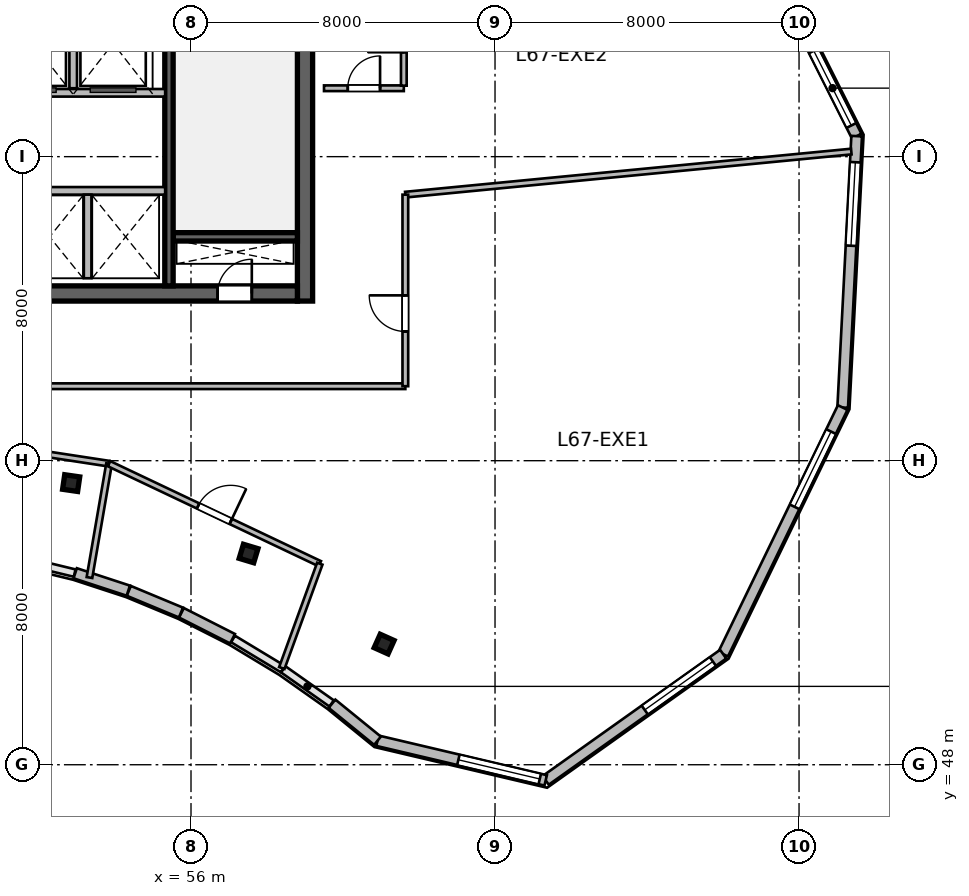
"""IFC4 building model, lengths in metres.
Left out: names, types, materials, properties, quantities, classifications, styles, units other than length and angle.
Written with IfcOpenShell. Run it as: python <this file> out.ifc"""

import sys

from ifc_helpers import new_model, si_unit, direction, frame, frame_2d, origin, origin_2d, place, context, subcontext, project, spatial, rectangle, i_section, extrude, source, transform, mapped, element, fill, save


model = new_model("IFC4")
c1 = context("Model", 3, precision=1e-05, world=origin(), true_north=direction((0.0, 1.0)))
c2 = subcontext(c1, "Body", "Model", "MODEL_VIEW")
j1 = project(units=[si_unit("LENGTHUNIT", "METRE"), si_unit("PLANEANGLEUNIT", "RADIAN")], contexts=[c1])
p1 = place(None, origin())
s1 = spatial("IfcSite", under=j1, at=p1, CompositionType="ELEMENT")
p2 = place(p1, origin())
s2 = spatial("IfcBuilding", under=s1, at=p2, CompositionType="ELEMENT")
p3 = place(p2, frame((0.0, 0.0, 275.7)))
s3 = spatial("IfcBuildingStorey", under=s2, at=p3, CompositionType="ELEMENT", Elevation=275.7)
m1 = source(origin(), c2, "Body", "SweptSolid", [
    extrude(rectangle(XDim=12.0, YDim=0.4, at=frame_2d((6.0, 0.0))), origin(), (0.0, 0.0, 1.0), 3.9),
])
p4 = place(p3, frame((59.0, 60.2, 0.0), z_axis=(0.0, 0.0, 1.0), x_axis=(0.0, 1.0, 0.0)))
e1 = element("IfcWall", 1, at=p4, inside=s3, PredefinedType="SHEAR", context=c2, shape_type="MappedRepresentation", body=[
    mapped(m1, transform((0.0, 0.0, 0.0), scale=1.0)),
])
m2 = source(origin(), c2, "Body", "SweptSolid", [
    extrude(rectangle(XDim=21.6, YDim=0.4, at=frame_2d((10.8, 0.0))), origin(), (0.0, 0.0, 1.0), 3.9),
])
p5 = place(p3, frame((37.2, 60.4, 0.0), z_axis=(0.0, 0.0, 1.0), x_axis=(1.0, 0.0, 0.0)))
e2 = element("IfcWall", 2, at=p5, inside=s3, PredefinedType="SHEAR", context=c2, shape_type="MappedRepresentation", body=[
    mapped(m2, transform((0.0, 0.0, 0.0), scale=1.0)),
])
p6 = place(p5, frame((1.1, 0.0, 0.0)))
e3 = element("IfcOpeningElement", 3, at=p6, cuts=e2, PredefinedType="OPENING", context=c2, shape_type="SweptSolid", body=[
    extrude(rectangle(XDim=1.15, YDim=2.15, at=frame_2d((0.575, 1.075))), frame((0.0, 0.21, 0.0), z_axis=(0.0, -1.0, 0.0), x_axis=(1.0, 0.0, 0.0)), (0.0, 0.0, 1.0), 0.42),
])
p7 = place(p5, frame((19.5, 0.0, 0.0)))
e4 = element("IfcOpeningElement", 4, at=p7, cuts=e2, PredefinedType="OPENING", context=c2, shape_type="SweptSolid", body=[
    extrude(rectangle(XDim=0.9, YDim=2.1, at=frame_2d((0.45, 1.05))), frame((0.0, 0.21, 0.0), z_axis=(0.0, -1.0, 0.0), x_axis=(1.0, 0.0, 0.0)), (0.0, 0.0, 1.0), 0.42),
])
p8 = place(p5, frame((12.02, 0.0, 0.0)))
e5 = element("IfcOpeningElement", 5, at=p8, cuts=e2, PredefinedType="OPENING", context=c2, shape_type="SweptSolid", body=[
    extrude(rectangle(XDim=1.6, YDim=2.15, at=frame_2d((0.8, 1.075))), frame((0.0, 0.21, 0.0), z_axis=(0.0, -1.0, 0.0), x_axis=(1.0, 0.0, 0.0)), (0.0, 0.0, 1.0), 0.42),
])
m3 = source(origin(), c2, "Body", "SweptSolid", [
    extrude(rectangle(XDim=3.27, YDim=0.22, at=frame_2d((1.635, 0.0))), origin(), (0.0, 0.0, 1.0), 3.9),
])
p9 = place(p3, frame((55.53, 61.89, 0.0), z_axis=(0.0, 0.0, 1.0), x_axis=(1.0, 0.0, 0.0)))
e6 = element("IfcWall", 6, at=p9, inside=s3, PredefinedType="SHEAR", context=c2, shape_type="MappedRepresentation", body=[
    mapped(m3, transform((0.0, 0.0, 0.0), scale=1.0)),
])
m4 = source(origin(), c2, "Body", "SweptSolid", [
    extrude(rectangle(XDim=11.2, YDim=0.22, at=frame_2d((5.6, 0.0))), origin(), (0.0, 0.0, 1.0), 3.9),
])
p10 = place(p3, frame((55.42, 60.6, 0.0), z_axis=(0.0, 0.0, 1.0), x_axis=(0.0, 1.0, 0.0)))
e7 = element("IfcWall", 7, at=p10, inside=s3, PredefinedType="SHEAR", context=c2, shape_type="MappedRepresentation", body=[
    mapped(m4, transform((0.0, 0.0, 0.0), scale=1.0)),
])
p11 = place(p10, frame((9.645, 0.0, 0.0)))
e8 = element("IfcOpeningElement", 8, at=p11, cuts=e7, PredefinedType="OPENING", context=c2, shape_type="SweptSolid", body=[
    extrude(rectangle(XDim=1.15, YDim=2.15, at=frame_2d((0.575, 1.075))), frame((0.0, 0.12, 0.0), z_axis=(0.0, -1.0, 0.0), x_axis=(1.0, 0.0, 0.0)), (0.0, 0.0, 1.0), 0.24),
])
m5 = source(origin(), c2, "Body", "SweptSolid", [
    extrude(i_section(OverallWidth=0.399, OverallDepth=0.387, WebThickness=0.021, FlangeThickness=0.033, at=origin_2d()), origin(), (0.0, 0.0, 1.0), 3.9),
])
for number, where, z_axis, x_axis in (
    (9, (52.846, 55.411, 0.0), (0.0, 0.0, 1.0), (0.143, 0.99, 0.0)),
    (10, (57.515, 53.558, 0.0), (0.0, 0.0, 1.0), (0.289, 0.957, 0.0)),
    (11, (61.082, 51.175, 0.0), (0.0, 0.0, 1.0), (0.409, 0.912, 0.0)),
):
    element("IfcColumn", number, at=place(p3, frame(where, z_axis=z_axis, x_axis=x_axis)), inside=s3, PredefinedType="COLUMN", context=c2, shape_type="MappedRepresentation", body=[
        mapped(m5, transform((0.0, 0.0, 0.0), scale=1.0)),
    ])
m6 = source(origin(), c2, "Body", "SweptSolid", [
    extrude(rectangle(XDim=5.653, YDim=0.28, at=frame_2d((2.827, 0.0))), origin(), (0.0, 0.0, 1.0), 3.64),
])
p12 = place(p3, frame((70.976, 69.591, 0.0), z_axis=(0.0, 0.0, 1.0), x_axis=(0.449302555419, -0.893379658205, 0.0)))
e12 = element("IfcWall", 12, at=p12, inside=s3, PredefinedType="SOLIDWALL", context=c2, shape_type="MappedRepresentation", body=[
    mapped(m6, transform((0.0, 0.0, 0.0), scale=1.0)),
])
p13 = place(p12, frame((3.14, 0.0, 0.95)))
e13 = element("IfcOpeningElement", 13, at=p13, cuts=e12, PredefinedType="OPENING", context=c2, shape_type="SweptSolid", body=[
    extrude(rectangle(XDim=2.2, YDim=2.1, at=frame_2d((1.1, 1.05))), frame((0.0, 0.15, 0.0), z_axis=(0.0, -1.0, 0.0), x_axis=(1.0, 0.0, 0.0)), (0.0, 0.0, 1.0), 0.3),
])
m7 = source(origin(), c2, "Body", "SweptSolid", [
    extrude(rectangle(XDim=7.151, YDim=0.28, at=frame_2d((3.576, 0.0))), origin(), (0.0, 0.0, 1.0), 3.64),
])
p14 = place(p3, frame((73.516, 64.54, 0.0), z_axis=(0.0, 0.0, 1.0), x_axis=(-0.051449614265, -0.998675591567, 0.0)))
e14 = element("IfcWall", 14, at=p14, inside=s3, PredefinedType="SOLIDWALL", context=c2, shape_type="MappedRepresentation", body=[
    mapped(m7, transform((0.0, 0.0, 0.0), scale=1.0)),
])
p15 = place(p14, frame((0.688, 0.0, 0.95)))
e15 = element("IfcOpeningElement", 15, at=p15, cuts=e14, PredefinedType="OPENING", context=c2, shape_type="SweptSolid", body=[
    extrude(rectangle(XDim=2.2, YDim=2.1, at=frame_2d((1.1, 1.05))), frame((0.0, 0.15, 0.0), z_axis=(0.0, -1.0, 0.0), x_axis=(1.0, 0.0, 0.0)), (0.0, 0.0, 1.0), 0.3),
])
m8 = source(origin(), c2, "Body", "SweptSolid", [
    extrude(rectangle(XDim=7.211, YDim=0.28, at=frame_2d((3.606, 0.0))), origin(), (0.0, 0.0, 1.0), 3.64),
])
p16 = place(p3, frame((73.148, 57.399, 0.0), z_axis=(0.0, 0.0, 1.0), x_axis=(-0.436088263006, -0.899903898685, 0.0)))
e16 = element("IfcWall", 16, at=p16, inside=s3, PredefinedType="SOLIDWALL", context=c2, shape_type="MappedRepresentation", body=[
    mapped(m8, transform((0.0, 0.0, 0.0), scale=1.0)),
])
p17 = place(p16, frame((0.703, 0.0, 0.95)))
e17 = element("IfcOpeningElement", 17, at=p17, cuts=e16, PredefinedType="OPENING", context=c2, shape_type="SweptSolid", body=[
    extrude(rectangle(XDim=2.2, YDim=2.1, at=frame_2d((1.1, 1.05))), frame((0.0, 0.15, 0.0), z_axis=(0.0, -1.0, 0.0), x_axis=(1.0, 0.0, 0.0)), (0.0, 0.0, 1.0), 0.3),
])
m9 = source(origin(), c2, "Body", "SweptSolid", [
    extrude(rectangle(XDim=5.731, YDim=0.28, at=frame_2d((2.865, 0.0))), origin(), (0.0, 0.0, 1.0), 3.64),
])
p18 = place(p3, frame((70.004, 50.909, 0.0), z_axis=(0.0, 0.0, 1.0), x_axis=(-0.815021045908, -0.579431354629, 0.0)))
e18 = element("IfcWall", 18, at=p18, inside=s3, PredefinedType="SOLIDWALL", context=c2, shape_type="MappedRepresentation", body=[
    mapped(m9, transform((0.0, 0.0, 0.0), scale=1.0)),
])
p19 = place(p18, frame((0.333, 0.0, 0.95)))
e19 = element("IfcOpeningElement", 19, at=p19, cuts=e18, PredefinedType="OPENING", context=c2, shape_type="SweptSolid", body=[
    extrude(rectangle(XDim=2.2, YDim=2.1, at=frame_2d((1.1, 1.05))), frame((0.0, 0.15, 0.0), z_axis=(0.0, -1.0, 0.0), x_axis=(1.0, 0.0, 0.0)), (0.0, 0.0, 1.0), 0.3),
])
m10 = source(origin(), c2, "Body", "SweptSolid", [
    extrude(rectangle(XDim=4.547, YDim=0.28, at=frame_2d((2.273, 0.0))), origin(), (0.0, 0.0, 1.0), 3.64),
])
p20 = place(p3, frame((65.333, 47.589, 0.0), z_axis=(0.0, 0.0, 1.0), x_axis=(-0.973332593516, 0.229398479505, 0.0)))
e20 = element("IfcWall", 20, at=p20, inside=s3, PredefinedType="SOLIDWALL", context=c2, shape_type="MappedRepresentation", body=[
    mapped(m10, transform((0.0, 0.0, 0.0), scale=1.0)),
])
p21 = place(p20, frame((0.16, 0.0, 0.95)))
e21 = element("IfcOpeningElement", 21, at=p21, cuts=e20, PredefinedType="OPENING", context=c2, shape_type="SweptSolid", body=[
    extrude(rectangle(XDim=2.2, YDim=2.1, at=frame_2d((1.1, 1.05))), frame((0.0, 0.15, 0.0), z_axis=(0.0, -1.0, 0.0), x_axis=(1.0, 0.0, 0.0)), (0.0, 0.0, 1.0), 0.3),
])
m11 = source(origin(), c2, "Body", "SweptSolid", [
    extrude(rectangle(XDim=1.543, YDim=0.28, at=frame_2d((0.772, 0.0))), origin(), (0.0, 0.0, 1.0), 3.64),
])
p22 = place(p3, frame((60.908, 48.632, 0.0), z_axis=(0.0, 0.0, 1.0), x_axis=(-0.77582846857, 0.63094388606, 0.0)))
e22 = element("IfcWall", 22, at=p22, inside=s3, PredefinedType="SOLIDWALL", context=c2, shape_type="MappedRepresentation", body=[
    mapped(m11, transform((0.0, 0.0, 0.0), scale=1.0)),
])
m12 = source(origin(), c2, "Body", "SweptSolid", [
    extrude(rectangle(XDim=1.509, YDim=0.28, at=frame_2d((0.754, 0.0))), origin(), (0.0, 0.0, 1.0), 3.64),
])
p23 = place(p3, frame((57.094, 51.315, 0.0), z_axis=(0.0, 0.0, 1.0), x_axis=(-0.89169189228, 0.452642871635, 0.0)))
e23 = element("IfcWall", 23, at=p23, inside=s3, PredefinedType="SOLIDWALL", context=c2, shape_type="MappedRepresentation", body=[
    mapped(m12, transform((0.0, 0.0, 0.0), scale=1.0)),
])
m13 = source(origin(), c2, "Body", "SweptSolid", [
    extrude(rectangle(XDim=1.488, YDim=0.28, at=frame_2d((0.744, 0.0))), origin(), (0.0, 0.0, 1.0), 3.64),
])
p24 = place(p3, frame((55.736, 52.004, 0.0), z_axis=(0.0, 0.0, 1.0), x_axis=(-0.923261314935, 0.384172545017, 0.0)))
e24 = element("IfcWall", 24, at=p24, inside=s3, PredefinedType="SOLIDWALL", context=c2, shape_type="MappedRepresentation", body=[
    mapped(m13, transform((0.0, 0.0, 0.0), scale=1.0)),
])
m14 = source(origin(), c2, "Body", "SweptSolid", [
    extrude(rectangle(XDim=1.47, YDim=0.28, at=frame_2d((0.735, 0.0))), origin(), (0.0, 0.0, 1.0), 3.64),
])
p25 = place(p3, frame((54.35, 52.58, 0.0), z_axis=(0.0, 0.0, 1.0), x_axis=(-0.950248878954, 0.311491682145, 0.0)))
e25 = element("IfcWall", 25, at=p25, inside=s3, PredefinedType="SOLIDWALL", context=c2, shape_type="MappedRepresentation", body=[
    mapped(m14, transform((0.0, 0.0, 0.0), scale=1.0)),
])
m15 = source(origin(), c2, "Body", "SweptSolid", [
    extrude(rectangle(XDim=2.4, YDim=0.2, at=frame_2d((1.2, 0.0))), origin(), (0.0, 0.0, 1.0), 3.64),
])
p26 = place(p3, frame((52.9, 65.8, 0.0), z_axis=(0.0, 0.0, 1.0), x_axis=(0.0, 1.0, 0.0)))
e26 = element("IfcWall", 26, at=p26, inside=s3, PredefinedType="SOLIDWALL", context=c2, shape_type="MappedRepresentation", body=[
    mapped(m15, transform((0.0, 0.0, 0.0), scale=1.0)),
])
m16 = source(origin(), c2, "Body", "SweptSolid", [
    extrude(rectangle(XDim=5.62, YDim=0.2, at=frame_2d((2.81, 0.0))), origin(), (0.0, 0.0, 1.0), 3.64),
])
p27 = place(p3, frame((49.7, 65.68, 0.0), z_axis=(0.0, 0.0, 1.0), x_axis=(1.0, 0.0, 0.0)))
e27 = element("IfcWall", 27, at=p27, inside=s3, PredefinedType="SOLIDWALL", context=c2, shape_type="MappedRepresentation", body=[
    mapped(m16, transform((0.0, 0.0, 0.0), scale=1.0)),
])
m17 = source(origin(), c2, "Body", "SweptSolid", [
    extrude(rectangle(XDim=4.1, YDim=0.2, at=frame_2d((2.05, 0.0))), origin(), (0.0, 0.0, 1.0), 3.64),
])
p28 = place(p3, frame((51.22, 63.1, 0.0), z_axis=(0.0, 0.0, 1.0), x_axis=(1.0, 0.0, 0.0)))
e28 = element("IfcWall", 28, at=p28, inside=s3, PredefinedType="SOLIDWALL", context=c2, shape_type="MappedRepresentation", body=[
    mapped(m17, transform((0.0, 0.0, 0.0), scale=1.0)),
])
m18 = source(origin(), c2, "Body", "SweptSolid", [
    extrude(rectangle(XDim=2.2, YDim=0.2, at=frame_2d((1.1, 0.0))), origin(), (0.0, 0.0, 1.0), 3.64),
])
p29 = place(p3, frame((53.28, 60.8, 0.0), z_axis=(0.0, 0.0, 1.0), x_axis=(0.0, 1.0, 0.0)))
e29 = element("IfcWall", 29, at=p29, inside=s3, PredefinedType="SOLIDWALL", context=c2, shape_type="MappedRepresentation", body=[
    mapped(m18, transform((0.0, 0.0, 0.0), scale=1.0)),
])
m19 = source(origin(), c2, "Body", "SweptSolid", [
    extrude(rectangle(XDim=2.1, YDim=0.15, at=frame_2d((1.05, 0.0))), origin(), (0.0, 0.0, 1.0), 3.64),
])
p30 = place(p3, frame((59.5, 65.8, 0.0), z_axis=(0.0, 0.0, 1.0), x_axis=(1.0, 0.0, 0.0)))
e30 = element("IfcWall", 30, at=p30, inside=s3, PredefinedType="PARTITIONING", context=c2, shape_type="MappedRepresentation", body=[
    mapped(m19, transform((0.0, 0.0, 0.0), scale=1.0)),
])
p31 = place(p30, frame((0.625, 0.0, 0.0)))
e31 = element("IfcOpeningElement", 31, at=p31, cuts=e30, PredefinedType="OPENING", context=c2, shape_type="SweptSolid", body=[
    extrude(rectangle(XDim=0.85, YDim=2.1, at=frame_2d((0.425, 1.05))), frame((0.0, 0.085, 0.0), z_axis=(0.0, -1.0, 0.0), x_axis=(1.0, 0.0, 0.0)), (0.0, 0.0, 1.0), 0.17),
])
m20 = source(origin(), c2, "Body", "SweptSolid", [
    extrude(rectangle(XDim=3.565, YDim=0.15, at=frame_2d((1.783, 0.0))), origin(), (0.0, 0.0, 1.0), 3.64),
])
p32 = place(p3, frame((61.6, 65.867, 0.0), z_axis=(0.0, 0.0, 1.0), x_axis=(0.0, 1.0, 0.0)))
e32 = element("IfcWall", 32, at=p32, inside=s3, PredefinedType="PARTITIONING", context=c2, shape_type="MappedRepresentation", body=[
    mapped(m20, transform((0.0, 0.0, 0.0), scale=1.0)),
])
p33 = place(p32, frame((0.88, 0.0, 0.0)))
e33 = element("IfcOpeningElement", 33, at=p33, cuts=e32, PredefinedType="OPENING", context=c2, shape_type="SweptSolid", body=[
    extrude(rectangle(XDim=0.95, YDim=2.1, at=frame_2d((0.475, 1.05))), frame((0.0, 0.085, 0.0), z_axis=(0.0, -1.0, 0.0), x_axis=(1.0, 0.0, 0.0)), (0.0, 0.0, 1.0), 0.17),
])
m21 = source(origin(), c2, "Body", "SweptSolid", [
    extrude(rectangle(XDim=5.912, YDim=0.15, at=frame_2d((2.956, 0.0))), origin(), (0.0, 0.0, 1.0), 3.64),
])
p34 = place(p3, frame((48.0, 56.813, 0.0), z_axis=(0.0, 0.0, 1.0), x_axis=(0.98854340791, -0.150936843342, 0.0)))
e34 = element("IfcWall", 34, at=p34, inside=s3, PredefinedType="PARTITIONING", context=c2, shape_type="MappedRepresentation", body=[
    mapped(m21, transform((0.0, 0.0, 0.0), scale=1.0)),
])
p35 = place(p34, frame((2.481, 0.0, 0.0)))
e35 = element("IfcOpeningElement", 35, at=p35, cuts=e34, PredefinedType="OPENING", context=c2, shape_type="SweptSolid", body=[
    extrude(rectangle(XDim=0.95, YDim=2.1, at=frame_2d((0.475, 1.05))), frame((0.0, 0.085, 0.0), z_axis=(0.0, -1.0, 0.0), x_axis=(1.0, 0.0, 0.0)), (0.0, 0.0, 1.0), 0.17),
])
m22 = source(origin(), c2, "Body", "SweptSolid", [
    extrude(rectangle(XDim=3.039, YDim=0.15, at=frame_2d((1.52, 0.0))), origin(), (0.0, 0.0, 1.0), 3.64),
])
p36 = place(p3, frame((53.328, 52.926, 0.0), z_axis=(0.0, 0.0, 1.0), x_axis=(0.169815455764, 0.985475880468, 0.0)))
e36 = element("IfcWall", 36, at=p36, inside=s3, PredefinedType="PARTITIONING", context=c2, shape_type="MappedRepresentation", body=[
    mapped(m22, transform((0.0, 0.0, 0.0), scale=1.0)),
])
m23 = source(origin(), c2, "Body", "SweptSolid", [
    extrude(rectangle(XDim=6.137, YDim=0.15, at=frame_2d((3.069, 0.0))), origin(), (0.0, 0.0, 1.0), 3.64),
])
p37 = place(p3, frame((53.844, 55.921, 0.0), z_axis=(0.0, 0.0, 1.0), x_axis=(0.903442784804, -0.428708682657, 0.0)))
e37 = element("IfcWall", 37, at=p37, inside=s3, PredefinedType="PARTITIONING", context=c2, shape_type="MappedRepresentation", body=[
    mapped(m23, transform((0.0, 0.0, 0.0), scale=1.0)),
])
p38 = place(p37, frame((2.594, 0.0, 0.0)))
e38 = element("IfcOpeningElement", 38, at=p38, cuts=e37, PredefinedType="OPENING", context=c2, shape_type="SweptSolid", body=[
    extrude(rectangle(XDim=0.95, YDim=2.1, at=frame_2d((0.475, 1.05))), frame((0.0, 0.085, 0.0), z_axis=(0.0, -1.0, 0.0), x_axis=(1.0, 0.0, 0.0)), (0.0, 0.0, 1.0), 0.17),
])
m24 = source(origin(), c2, "Body", "SweptSolid", [
    extrude(rectangle(XDim=2.921, YDim=0.15, at=frame_2d((1.46, 0.0))), origin(), (0.0, 0.0, 1.0), 3.64),
])
p39 = place(p3, frame((58.39, 50.545, 0.0), z_axis=(0.0, 0.0, 1.0), x_axis=(0.34203834657, 0.939685995147, 0.0)))
e39 = element("IfcWall", 39, at=p39, inside=s3, PredefinedType="PARTITIONING", context=c2, shape_type="MappedRepresentation", body=[
    mapped(m24, transform((0.0, 0.0, 0.0), scale=1.0)),
])
m25 = source(origin(), c2, "Body", "SweptSolid", [
    extrude(rectangle(XDim=12.39, YDim=0.15, at=frame_2d((6.195, 0.0))), origin(), (0.0, 0.0, 1.0), 3.27),
])
p40 = place(p3, frame((49.25, 57.96, 0.0), z_axis=(0.0, 0.0, 1.0), x_axis=(1.0, 0.0, 0.0)))
e40 = element("IfcWall", 40, at=p40, inside=s3, PredefinedType="PARTITIONING", context=c2, shape_type="MappedRepresentation", body=[
    mapped(m25, transform((0.0, 0.0, 0.0), scale=1.0)),
])
m26 = source(origin(), c2, "Body", "SweptSolid", [
    extrude(rectangle(XDim=11.79, YDim=0.15, at=frame_2d((5.895, 0.0))), origin(), (0.0, 0.0, 1.0), 3.64),
])
p41 = place(p3, frame((61.64, 63.0, 0.0), z_axis=(0.0, 0.0, 1.0), x_axis=(0.995363389039, 0.096185881295, 0.0)))
e41 = element("IfcWall", 41, at=p41, inside=s3, PredefinedType="PARTITIONING", context=c2, shape_type="MappedRepresentation", body=[
    mapped(m26, transform((0.0, 0.0, 0.0), scale=1.0)),
])
m27 = source(origin(), c2, "Body", "SweptSolid", [
    extrude(rectangle(XDim=5.04, YDim=0.15, at=frame_2d((2.52, 0.0))), origin(), (0.0, 0.0, 1.0), 3.64),
])
p42 = place(p3, frame((61.64, 57.96, 0.0), z_axis=(0.0, 0.0, 1.0), x_axis=(0.0, 1.0, 0.0)))
e42 = element("IfcWall", 42, at=p42, inside=s3, PredefinedType="PARTITIONING", context=c2, shape_type="MappedRepresentation", body=[
    mapped(m27, transform((0.0, 0.0, 0.0), scale=1.0)),
])
p43 = place(p42, frame((1.44, 0.0, 0.0)))
e43 = element("IfcOpeningElement", 43, at=p43, cuts=e42, PredefinedType="OPENING", context=c2, shape_type="SweptSolid", body=[
    extrude(rectangle(XDim=0.95, YDim=2.1, at=frame_2d((0.475, 1.05))), frame((0.0, 0.085, 0.0), z_axis=(0.0, -1.0, 0.0), x_axis=(1.0, 0.0, 0.0)), (0.0, 0.0, 1.0), 0.17),
])
m28 = source(origin(), c2, "Body", "SweptSolid", [
    extrude(rectangle(XDim=2.2, YDim=2.1, at=frame_2d((1.1, 1.05))), frame((0.0, 0.03, 0.0), z_axis=(0.0, -1.0, 0.0), x_axis=(1.0, 0.0, 0.0)), (0.0, 0.0, 1.0), 0.06),
])
p44 = place(p13, origin())
e44 = element("IfcWindow", 44, at=p44, inside=s3, PartitioningType="TRIPLE_PANEL_VERTICAL", PredefinedType="WINDOW", context=c2, shape_type="MappedRepresentation", body=[
    mapped(m28, transform((0.0, 0.0, 0.0), scale=1.0)),
])
fill(e13, e44)
p45 = place(p15, origin())
e45 = element("IfcWindow", 45, at=p45, inside=s3, PartitioningType="TRIPLE_PANEL_VERTICAL", PredefinedType="WINDOW", context=c2, shape_type="MappedRepresentation", body=[
    mapped(m28, transform((0.0, 0.0, 0.0), scale=1.0)),
])
fill(e15, e45)
p46 = place(p17, origin())
e46 = element("IfcWindow", 46, at=p46, inside=s3, PartitioningType="TRIPLE_PANEL_VERTICAL", PredefinedType="WINDOW", context=c2, shape_type="MappedRepresentation", body=[
    mapped(m28, transform((0.0, 0.0, 0.0), scale=1.0)),
])
fill(e17, e46)
p47 = place(p19, origin())
e47 = element("IfcWindow", 47, at=p47, inside=s3, PartitioningType="TRIPLE_PANEL_VERTICAL", PredefinedType="WINDOW", context=c2, shape_type="MappedRepresentation", body=[
    mapped(m28, transform((0.0, 0.0, 0.0), scale=1.0)),
])
fill(e19, e47)
p48 = place(p21, origin())
e48 = element("IfcWindow", 48, at=p48, inside=s3, PartitioningType="TRIPLE_PANEL_VERTICAL", PredefinedType="WINDOW", context=c2, shape_type="MappedRepresentation", body=[
    mapped(m28, transform((0.0, 0.0, 0.0), scale=1.0)),
])
fill(e21, e48)
m29 = source(origin(), c2, "Body", "SweptSolid", [
    extrude(rectangle(XDim=0.9, YDim=2.1, at=frame_2d((0.45, 1.05))), frame((0.0, 0.025, 0.0), z_axis=(0.0, -1.0, 0.0), x_axis=(1.0, 0.0, 0.0)), (0.0, 0.0, 1.0), 0.05),
])
p49 = place(p7, origin())
e49 = element("IfcDoor", 49, at=p49, inside=s3, OperationType="SINGLE_SWING_RIGHT", PredefinedType="DOOR", context=c2, shape_type="MappedRepresentation", body=[
    mapped(m29, transform((0.0, 0.0, 0.0), scale=1.0)),
])
fill(e4, e49)
m30 = source(origin(), c2, "Body", "SweptSolid", [
    extrude(rectangle(XDim=0.85, YDim=2.1, at=frame_2d((0.425, 1.05))), frame((0.0, 0.025, 0.0), z_axis=(0.0, -1.0, 0.0), x_axis=(1.0, 0.0, 0.0)), (0.0, 0.0, 1.0), 0.05),
])
p50 = place(p31, origin())
e50 = element("IfcDoor", 50, at=p50, inside=s3, OperationType="SINGLE_SWING_RIGHT", PredefinedType="DOOR", context=c2, shape_type="MappedRepresentation", body=[
    mapped(m30, transform((0.0, 0.0, 0.0), scale=1.0)),
])
fill(e31, e50)
m31 = source(origin(), c2, "Body", "SweptSolid", [
    extrude(rectangle(XDim=0.95, YDim=2.1, at=frame_2d((0.475, 1.05))), frame((0.0, 0.025, 0.0), z_axis=(0.0, -1.0, 0.0), x_axis=(1.0, 0.0, 0.0)), (0.0, 0.0, 1.0), 0.05),
])
p51 = place(p38, origin())
e51 = element("IfcDoor", 51, at=p51, inside=s3, OperationType="SINGLE_SWING_RIGHT", PredefinedType="DOOR", context=c2, shape_type="MappedRepresentation", body=[
    mapped(m31, transform((0.0, 0.0, 0.0), scale=1.0)),
])
fill(e38, e51)
p52 = place(p43, origin())
e52 = element("IfcDoor", 52, at=p52, inside=s3, OperationType="SINGLE_SWING_RIGHT", PredefinedType="DOOR", context=c2, shape_type="MappedRepresentation", body=[
    mapped(m31, transform((0.0, 0.0, 0.0), scale=1.0)),
])
fill(e43, e52)
p53 = place(p33, origin())
e53 = element("IfcDoor", 53, at=p53, inside=s3, OperationType="SINGLE_SWING_LEFT", PredefinedType="DOOR", context=c2, shape_type="MappedRepresentation", body=[
    mapped(m31, transform((0.0, 0.0, 0.0), scale=1.0)),
])
fill(e33, e53)
save(model, sys.argv[1])
